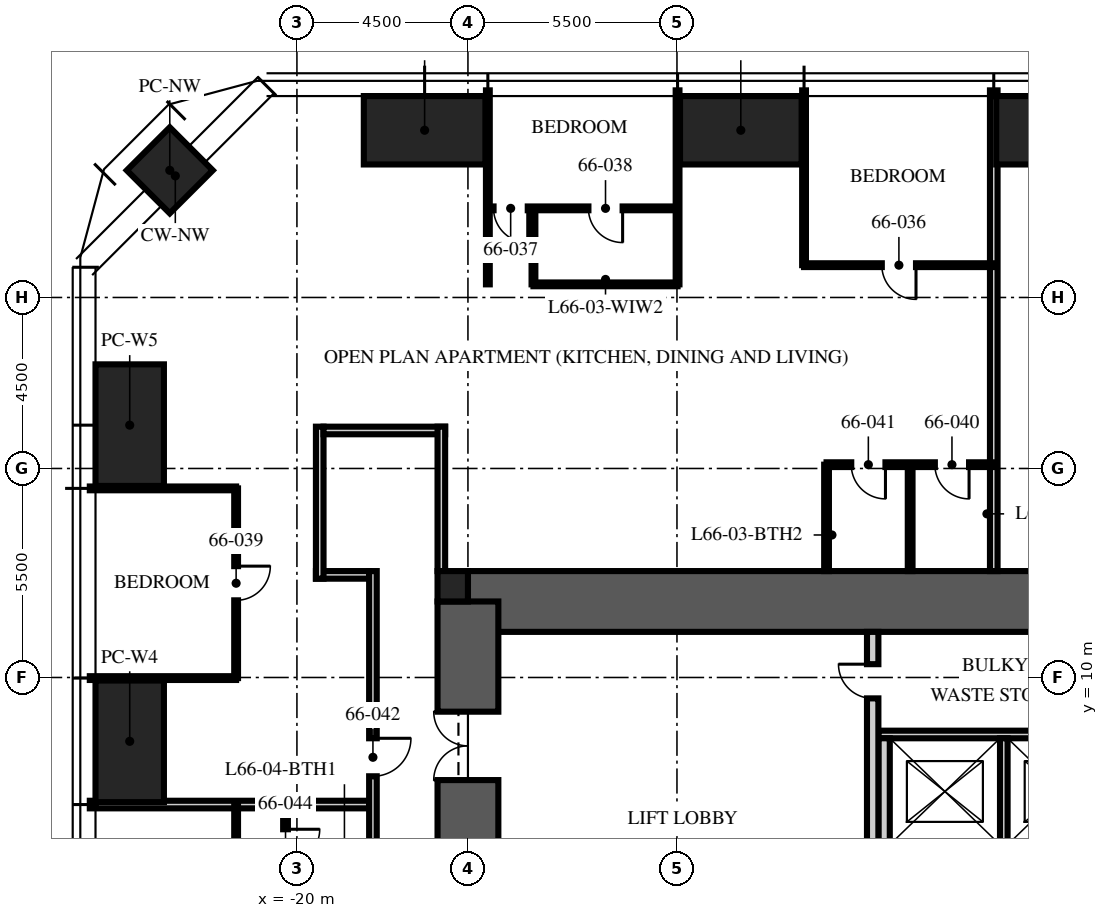
"""IFC4 building model, lengths in metres.
Left out: names, types, materials, properties, quantities, classifications, styles, units other than length and angle.
Written with IfcOpenShell. Run it as: python <this file> out.ifc"""

import sys

from ifc_helpers import new_model, si_unit, direction, frame, frame_2d, origin, origin_2d, place, context, subcontext, project, spatial, rectangle, hollow_rectangle, extrude, element, fill, save


model = new_model("IFC4")
c1 = context("Model", 3, precision=1e-05, world=origin(), true_north=direction((0.0, 1.0)))
c2 = subcontext(c1, "Body", "Model", "MODEL_VIEW")
j1 = project(units=[si_unit("LENGTHUNIT", "METRE"), si_unit("PLANEANGLEUNIT", "RADIAN")], contexts=[c1])
p1 = place(None, origin())
s1 = spatial("IfcSite", under=j1, at=p1, CompositionType="ELEMENT")
p2 = place(p1, origin())
s2 = spatial("IfcBuilding", under=s1, at=p2, CompositionType="ELEMENT")
p3 = place(p2, frame((0.0, 0.0, 263.25)))
s3 = spatial("IfcBuildingStorey", under=s2, at=p3, CompositionType="ELEMENT", Elevation=263.25)
p4 = place(p3, frame((-15.5, 12.0, -0.25), z_axis=(0.0, 0.0, 1.0), x_axis=(1.0, 0.0, 0.0)))
e1 = element("IfcWall", 1, at=p4, inside=s3, PredefinedType="SHEAR", context=c2, shape_type="SweptSolid", body=[
    extrude(rectangle(XDim=31.0, YDim=1.6, at=frame_2d((15.5, 0.0))), origin(), (0.0, 0.0, 1.0), 3.75),
])
p5 = place(p3, frame((-15.5, -12.0, -0.25), z_axis=(0.0, 0.0, 1.0), x_axis=(0.0, 1.0, 0.0)))
e2 = element("IfcWall", 2, at=p5, inside=s3, PredefinedType="SHEAR", context=c2, shape_type="SweptSolid", body=[
    extrude(rectangle(XDim=24.0, YDim=1.6, at=frame_2d((12.0, 0.0))), origin(), (0.0, 0.0, 1.0), 3.75),
])
p6 = place(p5, frame((3.2, 0.0, 0.25)))
e3 = element("IfcOpeningElement", 3, at=p6, cuts=e2, PredefinedType="OPENING", context=c2, shape_type="SweptSolid", body=[
    extrude(rectangle(XDim=1.2, YDim=2.1, at=frame_2d((0.6, 1.05))), frame((0.0, 0.81, 0.0), z_axis=(0.0, -1.0, 0.0), x_axis=(1.0, 0.0, 0.0)), (0.0, 0.0, 1.0), 1.62),
])
p7 = place(p5, frame((19.3, 0.0, 0.25)))
e4 = element("IfcOpeningElement", 4, at=p7, cuts=e2, PredefinedType="OPENING", context=c2, shape_type="SweptSolid", body=[
    extrude(rectangle(XDim=1.8, YDim=2.1, at=frame_2d((0.9, 1.05))), frame((0.0, 0.81, 0.0), z_axis=(0.0, -1.0, 0.0), x_axis=(1.0, 0.0, 0.0)), (0.0, 0.0, 1.0), 1.62),
])
p8 = place(p3, frame((-15.9, 12.4, -0.25), z_axis=(0.0, 0.0, 1.0), x_axis=(1.0, 0.0, 0.0)))
e5 = element("IfcColumn", 5, at=p8, inside=s3, PredefinedType="COLUMN", context=c2, shape_type="SweptSolid", body=[
    extrude(rectangle(XDim=0.8, YDim=0.8, at=origin_2d()), origin(), (0.0, 0.0, 1.0), 3.75),
])
for number, where, z_axis, x_axis in (
    (6, (-16.64, 24.4, 0.0), (0.0, 0.0, 1.0), (1.0, 0.0, 0.0)),
    (7, (-8.32, 24.4, 0.0), (0.0, 0.0, 1.0), (1.0, 0.0, 0.0)),
    (8, (0.0, 24.4, 0.0), (0.0, 0.0, 1.0), (1.0, 0.0, 0.0)),
    (9, (-24.4, 8.32, 0.0), (0.0, 0.0, 1.0), (0.0, 1.0, 0.0)),
    (10, (-24.4, 16.64, 0.0), (0.0, 0.0, 1.0), (0.0, 1.0, 0.0)),
):
    element("IfcColumn", number, at=place(p3, frame(where, z_axis=z_axis, x_axis=x_axis)), inside=s3, PredefinedType="COLUMN", context=c2, shape_type="SweptSolid", body=[
        extrude(hollow_rectangle(XDim=3.2, YDim=1.8, WallThickness=0.14, at=origin_2d()), origin(), (0.0, 0.0, 1.0), 3.75),
    ])
p9 = place(p3, frame((-23.346, 23.346, 0.0), z_axis=(0.0, 0.0, 1.0), x_axis=(0.707106781187, 0.707106781187, 0.0)))
e11 = element("IfcColumn", 11, at=p9, inside=s3, PredefinedType="COLUMN", context=c2, shape_type="SweptSolid", body=[
    extrude(hollow_rectangle(XDim=1.6, YDim=1.6, WallThickness=0.1, at=origin_2d()), origin(), (0.0, 0.0, 1.0), 3.75),
])
p10 = place(p3, frame((-4.7, 8.5, 0.0), z_axis=(0.0, 0.0, 1.0), x_axis=(1.0, 0.0, 0.0)))
e12 = element("IfcWall", 12, at=p10, inside=s3, PredefinedType="PARTITIONING", context=c2, shape_type="SweptSolid", body=[
    extrude(rectangle(XDim=9.7, YDim=0.2, at=frame_2d((4.85, 0.0))), origin(), (0.0, 0.0, 1.0), 3.5),
])
p11 = place(p3, frame((-4.55, 5.6, 0.0), z_axis=(0.0, 0.0, 1.0), x_axis=(0.0, 1.0, 0.0)))
e13 = element("IfcWall", 13, at=p11, inside=s3, PredefinedType="PARTITIONING", context=c2, shape_type="SweptSolid", body=[
    extrude(rectangle(XDim=2.8, YDim=0.3, at=frame_2d((1.4, 0.0))), origin(), (0.0, 0.0, 1.0), 3.5),
])
p12 = place(p3, frame((-1.4, 5.6, 0.0), z_axis=(0.0, 0.0, 1.0), x_axis=(0.0, 1.0, 0.0)))
e14 = element("IfcWall", 14, at=p12, inside=s3, PredefinedType="PARTITIONING", context=c2, shape_type="SweptSolid", body=[
    extrude(rectangle(XDim=2.8, YDim=0.2, at=frame_2d((1.4, 0.0))), origin(), (0.0, 0.0, 1.0), 3.5),
])
p13 = place(p3, frame((-4.85, 5.3, 0.0), z_axis=(0.0, 0.0, 1.0), x_axis=(0.0, 1.0, 0.0)))
e15 = element("IfcWall", 15, at=p13, inside=s3, PredefinedType="PARTITIONING", context=c2, shape_type="SweptSolid", body=[
    extrude(rectangle(XDim=5.9, YDim=0.3, at=frame_2d((2.95, 0.0))), origin(), (0.0, 0.0, 1.0), 3.5),
])
p14 = place(p13, frame((4.15, 0.0, 0.0)))
e16 = element("IfcOpeningElement", 16, at=p14, cuts=e15, PredefinedType="OPENING", context=c2, shape_type="SweptSolid", body=[
    extrude(rectangle(XDim=0.9, YDim=2.1, at=frame_2d((0.45, 1.05))), frame((0.0, 0.16, 0.0), z_axis=(0.0, -1.0, 0.0), x_axis=(1.0, 0.0, 0.0)), (0.0, 0.0, 1.0), 0.32),
])
p15 = place(p3, frame((-18.1, 12.7, 0.0), z_axis=(0.0, 0.0, 1.0), x_axis=(-1.0, 0.0, 0.0)))
e17 = element("IfcWall", 17, at=p15, inside=s3, PredefinedType="PARTITIONING", context=c2, shape_type="SweptSolid", body=[
    extrude(rectangle(XDim=1.4, YDim=0.2, at=frame_2d((0.7, 0.0))), origin(), (0.0, 0.0, 1.0), 2.81),
])
p16 = place(p3, frame((-19.4, 12.6, 0.0), z_axis=(0.0, 0.0, 1.0), x_axis=(0.0, 1.0, 0.0)))
e18 = element("IfcWall", 18, at=p16, inside=s3, PredefinedType="PARTITIONING", context=c2, shape_type="SweptSolid", body=[
    extrude(rectangle(XDim=4.0, YDim=0.2, at=frame_2d((2.0, 0.0))), origin(), (0.0, 0.0, 1.0), 2.6),
])
p17 = place(p3, frame((-19.3, 16.5, 0.0), z_axis=(0.0, 0.0, 1.0), x_axis=(1.0, 0.0, 0.0)))
e19 = element("IfcWall", 19, at=p17, inside=s3, PredefinedType="PARTITIONING", context=c2, shape_type="SweptSolid", body=[
    extrude(rectangle(XDim=3.2, YDim=0.2, at=frame_2d((1.6, 0.0))), origin(), (0.0, 0.0, 1.0), 2.3),
])
p18 = place(p3, frame((-16.2, 16.6, 0.0), z_axis=(0.0, 0.0, 1.0), x_axis=(0.0, -1.0, 0.0)))
e20 = element("IfcWall", 20, at=p18, inside=s3, PredefinedType="PARTITIONING", context=c2, shape_type="SweptSolid", body=[
    extrude(rectangle(XDim=3.8, YDim=0.2, at=frame_2d((1.9, 0.0))), origin(), (0.0, 0.0, 1.0), 2.3),
])
p19 = place(p3, frame((-1.664, 12.8, 0.0), z_axis=(0.0, 0.0, 1.0), x_axis=(0.0, 1.0, 0.0)))
e21 = element("IfcWall", 21, at=p19, inside=s3, PredefinedType="PARTITIONING", context=c2, shape_type="SweptSolid", body=[
    extrude(rectangle(XDim=12.65, YDim=0.2, at=frame_2d((6.325, 0.0))), origin(), (0.0, 0.0, 1.0), 2.91),
])
p20 = place(p3, frame((-6.656, 20.85, 0.0), z_axis=(0.0, 0.0, 1.0), x_axis=(0.0, 1.0, 0.0)))
e22 = element("IfcWall", 22, at=p20, inside=s3, PredefinedType="PARTITIONING", context=c2, shape_type="SweptSolid", body=[
    extrude(rectangle(XDim=4.6, YDim=0.1, at=frame_2d((2.3, 0.0))), origin(), (0.0, 0.0, 1.0), 2.91),
])
for number, where, z_axis, x_axis in (
    (23, (-9.984, 20.345, 0.0), (0.0, 0.0, 1.0), (0.0, 1.0, 0.0)),
    (24, (-14.976, 20.345, 0.0), (0.0, 0.0, 1.0), (0.0, 1.0, 0.0)),
):
    element("IfcWall", number, at=place(p3, frame(where, z_axis=z_axis, x_axis=x_axis)), inside=s3, PredefinedType="PARTITIONING", context=c2, shape_type="SweptSolid", body=[
        extrude(rectangle(XDim=5.105, YDim=0.1, at=frame_2d((2.552, 0.0))), origin(), (0.0, 0.0, 1.0), 2.91),
    ])
for number, where, z_axis, x_axis in (
    (25, (-21.6, 14.976, 0.0), (0.0, 0.0, 1.0), (-1.0, 0.0, 0.0)),
    (26, (-21.6, 9.984, 0.0), (0.0, 0.0, 1.0), (-1.0, 0.0, 0.0)),
):
    element("IfcWall", number, at=place(p3, frame(where, z_axis=z_axis, x_axis=x_axis)), inside=s3, PredefinedType="PARTITIONING", context=c2, shape_type="SweptSolid", body=[
        extrude(rectangle(XDim=3.85, YDim=0.1, at=frame_2d((1.925, 0.0))), origin(), (0.0, 0.0, 1.0), 2.91),
    ])
p21 = place(p3, frame((-18.1, 6.656, 0.0), z_axis=(0.0, 0.0, 1.0), x_axis=(-1.0, 0.0, 0.0)))
e27 = element("IfcWall", 27, at=p21, inside=s3, PredefinedType="PARTITIONING", context=c2, shape_type="SweptSolid", body=[
    extrude(rectangle(XDim=7.35, YDim=0.2, at=frame_2d((3.675, 0.0))), origin(), (0.0, 0.0, 1.0), 2.91),
])
p22 = place(p3, frame((-1.664, 20.85, 0.0), z_axis=(0.0, 0.0, 1.0), x_axis=(-1.0, 0.0, 0.0)))
e28 = element("IfcWall", 28, at=p22, inside=s3, PredefinedType="PARTITIONING", context=c2, shape_type="SweptSolid", body=[
    extrude(rectangle(XDim=4.992, YDim=0.1, at=frame_2d((2.496, 0.0))), origin(), (0.0, 0.0, 1.0), 2.81),
])
p23 = place(p22, frame((2.046, 0.0, 0.0)))
e29 = element("IfcOpeningElement", 29, at=p23, cuts=e28, PredefinedType="OPENING", context=c2, shape_type="SweptSolid", body=[
    extrude(rectangle(XDim=0.9, YDim=2.1, at=frame_2d((0.45, 1.05))), frame((0.0, 0.06, 0.0), z_axis=(0.0, -1.0, 0.0), x_axis=(1.0, 0.0, 0.0)), (0.0, 0.0, 1.0), 0.12),
])
p24 = place(p3, frame((-9.984, 22.345, 0.0), z_axis=(0.0, 0.0, 1.0), x_axis=(-1.0, 0.0, 0.0)))
e30 = element("IfcWall", 30, at=p24, inside=s3, PredefinedType="PARTITIONING", context=c2, shape_type="SweptSolid", body=[
    extrude(rectangle(XDim=4.992, YDim=0.1, at=frame_2d((2.496, 0.0))), origin(), (0.0, 0.0, 1.0), 2.81),
])
p25 = place(p24, frame((3.942, 0.0, 0.0)))
e31 = element("IfcOpeningElement", 31, at=p25, cuts=e30, PredefinedType="OPENING", context=c2, shape_type="SweptSolid", body=[
    extrude(rectangle(XDim=0.9, YDim=2.1, at=frame_2d((0.45, 1.05))), frame((0.0, 0.06, 0.0), z_axis=(0.0, -1.0, 0.0), x_axis=(1.0, 0.0, 0.0)), (0.0, 0.0, 1.0), 0.12),
])
p26 = place(p24, frame((1.446, 0.0, 0.0)))
e32 = element("IfcOpeningElement", 32, at=p26, cuts=e30, PredefinedType="OPENING", context=c2, shape_type="SweptSolid", body=[
    extrude(rectangle(XDim=0.9, YDim=2.1, at=frame_2d((0.45, 1.05))), frame((0.0, 0.06, 0.0), z_axis=(0.0, -1.0, 0.0), x_axis=(1.0, 0.0, 0.0)), (0.0, 0.0, 1.0), 0.12),
])
p27 = place(p3, frame((-13.776, 20.345, 0.0), z_axis=(0.0, 0.0, 1.0), x_axis=(0.0, 1.0, 0.0)))
e33 = element("IfcWall", 33, at=p27, inside=s3, PredefinedType="PARTITIONING", context=c2, shape_type="SweptSolid", body=[
    extrude(rectangle(XDim=2.0, YDim=0.1, at=frame_2d((1.0, 0.0))), origin(), (0.0, 0.0, 1.0), 3.5),
])
p28 = place(p3, frame((-9.984, 20.345, 0.0), z_axis=(0.0, 0.0, 1.0), x_axis=(-1.0, 0.0, 0.0)))
e34 = element("IfcWall", 34, at=p28, inside=s3, PredefinedType="PARTITIONING", context=c2, shape_type="SweptSolid", body=[
    extrude(rectangle(XDim=3.792, YDim=0.1, at=frame_2d((1.896, 0.0))), origin(), (0.0, 0.0, 1.0), 2.81),
])
p29 = place(p3, frame((-21.6, 14.976, 0.0), z_axis=(0.0, 0.0, 1.0), x_axis=(0.0, -1.0, 0.0)))
e35 = element("IfcWall", 35, at=p29, inside=s3, PredefinedType="PARTITIONING", context=c2, shape_type="SweptSolid", body=[
    extrude(rectangle(XDim=4.992, YDim=0.1, at=frame_2d((2.496, 0.0))), origin(), (0.0, 0.0, 1.0), 2.81),
])
p30 = place(p29, frame((2.046, 0.0, 0.0)))
e36 = element("IfcOpeningElement", 36, at=p30, cuts=e35, PredefinedType="OPENING", context=c2, shape_type="SweptSolid", body=[
    extrude(rectangle(XDim=0.9, YDim=2.1, at=frame_2d((0.45, 1.05))), frame((0.0, 0.06, 0.0), z_axis=(0.0, -1.0, 0.0), x_axis=(1.0, 0.0, 0.0)), (0.0, 0.0, 1.0), 0.12),
])
p31 = place(p3, frame((-1.664, 15.6, 0.0), z_axis=(0.0, 0.0, 1.0), x_axis=(-1.0, 0.0, 0.0)))
e37 = element("IfcWall", 37, at=p31, inside=s3, PredefinedType="PARTITIONING", context=c2, shape_type="SweptSolid", body=[
    extrude(rectangle(XDim=4.4, YDim=0.125, at=frame_2d((2.2, 0.0))), origin(), (0.0, 0.0, 1.0), 2.81),
])
p32 = place(p31, frame((0.65, 0.0, 0.0)))
e38 = element("IfcOpeningElement", 38, at=p32, cuts=e37, PredefinedType="OPENING", context=c2, shape_type="SweptSolid", body=[
    extrude(rectangle(XDim=0.9, YDim=2.1, at=frame_2d((0.45, 1.05))), frame((0.0, 0.073, 0.0), z_axis=(0.0, -1.0, 0.0), x_axis=(1.0, 0.0, 0.0)), (0.0, 0.0, 1.0), 0.145),
])
p33 = place(p31, frame((2.85, 0.0, 0.0)))
e39 = element("IfcOpeningElement", 39, at=p33, cuts=e37, PredefinedType="OPENING", context=c2, shape_type="SweptSolid", body=[
    extrude(rectangle(XDim=0.9, YDim=2.1, at=frame_2d((0.45, 1.05))), frame((0.0, 0.073, 0.0), z_axis=(0.0, -1.0, 0.0), x_axis=(1.0, 0.0, 0.0)), (0.0, 0.0, 1.0), 0.145),
])
for number, where, z_axis, x_axis in (
    (40, (-3.864, 12.8, 0.0), (0.0, 0.0, 1.0), (0.0, 1.0, 0.0)),
    (41, (-6.064, 12.8, 0.0), (0.0, 0.0, 1.0), (0.0, 1.0, 0.0)),
):
    element("IfcWall", number, at=place(p3, frame(where, z_axis=z_axis, x_axis=x_axis)), inside=s3, PredefinedType="PARTITIONING", context=c2, shape_type="SweptSolid", body=[
        extrude(rectangle(XDim=2.8, YDim=0.125, at=frame_2d((1.4, 0.0))), origin(), (0.0, 0.0, 1.0), 3.5),
    ])
p34 = place(p3, frame((-21.6, 6.656, 0.0), z_axis=(0.0, 0.0, 1.0), x_axis=(0.0, -1.0, 0.0)))
e42 = element("IfcWall", 42, at=p34, inside=s3, PredefinedType="PARTITIONING", context=c2, shape_type="SweptSolid", body=[
    extrude(rectangle(XDim=4.992, YDim=0.1, at=frame_2d((2.496, 0.0))), origin(), (0.0, 0.0, 1.0), 2.81),
])
p35 = place(p34, frame((2.046, 0.0, 0.0)))
e43 = element("IfcOpeningElement", 43, at=p35, cuts=e42, PredefinedType="OPENING", context=c2, shape_type="SweptSolid", body=[
    extrude(rectangle(XDim=0.9, YDim=2.1, at=frame_2d((0.45, 1.05))), frame((0.0, 0.06, 0.0), z_axis=(0.0, -1.0, 0.0), x_axis=(1.0, 0.0, 0.0)), (0.0, 0.0, 1.0), 0.12),
])
p36 = place(p3, frame((-20.3, 6.656, 0.0), z_axis=(0.0, 0.0, 1.0), x_axis=(0.0, -1.0, 0.0)))
e44 = element("IfcWall", 44, at=p36, inside=s3, PredefinedType="PARTITIONING", context=c2, shape_type="SweptSolid", body=[
    extrude(rectangle(XDim=2.2, YDim=0.125, at=frame_2d((1.1, 0.0))), origin(), (0.0, 0.0, 1.0), 3.5),
])
p37 = place(p36, frame((0.65, 0.0, 0.0)))
e45 = element("IfcOpeningElement", 45, at=p37, cuts=e44, PredefinedType="OPENING", context=c2, shape_type="SweptSolid", body=[
    extrude(rectangle(XDim=0.9, YDim=2.1, at=frame_2d((0.45, 1.05))), frame((0.0, 0.073, 0.0), z_axis=(0.0, -1.0, 0.0), x_axis=(1.0, 0.0, 0.0)), (0.0, 0.0, 1.0), 0.145),
])
p38 = place(p3, frame((-18.0, 12.8, 0.0), z_axis=(0.0, 0.0, 1.0), x_axis=(0.0, -1.0, 0.0)))
e46 = element("IfcWall", 46, at=p38, inside=s3, PredefinedType="PARTITIONING", context=c2, shape_type="SweptSolid", body=[
    extrude(rectangle(XDim=25.8, YDim=0.2, at=frame_2d((12.9, 0.0))), origin(), (0.0, 0.0, 1.0), 2.6),
])
p39 = place(p38, frame((4.4, 0.0, 0.0)))
e47 = element("IfcOpeningElement", 47, at=p39, cuts=e46, PredefinedType="OPENING", context=c2, shape_type="SweptSolid", body=[
    extrude(rectangle(XDim=1.0, YDim=2.2, at=frame_2d((0.5, 1.1))), frame((0.0, 0.11, 0.0), z_axis=(0.0, -1.0, 0.0), x_axis=(1.0, 0.0, 0.0)), (0.0, 0.0, 1.0), 0.22),
])
p40 = place(p38, frame((12.914, 0.0, 0.0)))
e48 = element("IfcOpeningElement", 48, at=p40, cuts=e46, PredefinedType="OPENING", context=c2, shape_type="SweptSolid", body=[
    extrude(rectangle(XDim=1.0, YDim=2.2, at=frame_2d((0.5, 1.1))), frame((0.0, 0.11, 0.0), z_axis=(0.0, -1.0, 0.0), x_axis=(1.0, 0.0, 0.0)), (0.0, 0.0, 1.0), 0.22),
])
p41 = place(p38, frame((23.484, 0.0, 0.0)))
e49 = element("IfcOpeningElement", 49, at=p41, cuts=e46, PredefinedType="OPENING", context=c2, shape_type="SweptSolid", body=[
    extrude(rectangle(XDim=1.0, YDim=2.2, at=frame_2d((0.5, 1.1))), frame((0.0, 0.11, 0.0), z_axis=(0.0, -1.0, 0.0), x_axis=(1.0, 0.0, 0.0)), (0.0, 0.0, 1.0), 0.22),
])
p42 = place(p7, origin())
e50 = element("IfcDoor", 50, at=p42, inside=s3, OperationType="DOUBLE_DOOR_SINGLE_SWING", PredefinedType="DOOR", context=c2, shape_type="SweptSolid", body=[
    extrude(rectangle(XDim=1.8, YDim=2.1, at=frame_2d((0.9, 1.05))), frame((0.0, 0.025, 0.0), z_axis=(0.0, -1.0, 0.0), x_axis=(1.0, 0.0, 0.0)), (0.0, 0.0, 1.0), 0.05),
])
fill(e4, e50)
p43 = place(p14, origin())
e51 = element("IfcDoor", 51, at=p43, inside=s3, OperationType="SINGLE_SWING_RIGHT", PredefinedType="DOOR", context=c2, shape_type="SweptSolid", body=[
    extrude(rectangle(XDim=0.9, YDim=2.1, at=frame_2d((0.45, 1.05))), frame((0.0, 0.025, 0.0), z_axis=(0.0, -1.0, 0.0), x_axis=(1.0, 0.0, 0.0)), (0.0, 0.0, 1.0), 0.05),
])
fill(e16, e51)
p44 = place(p23, origin())
e52 = element("IfcDoor", 52, at=p44, inside=s3, OperationType="SINGLE_SWING_LEFT", PredefinedType="DOOR", context=c2, shape_type="SweptSolid", body=[
    extrude(rectangle(XDim=0.9, YDim=2.1, at=frame_2d((0.45, 1.05))), frame((0.0, 0.025, 0.0), z_axis=(0.0, -1.0, 0.0), x_axis=(1.0, 0.0, 0.0)), (0.0, 0.0, 1.0), 0.05),
])
fill(e29, e52)
p45 = place(p25, origin())
e53 = element("IfcDoor", 53, at=p45, inside=s3, OperationType="SINGLE_SWING_LEFT", PredefinedType="DOOR", context=c2, shape_type="SweptSolid", body=[
    extrude(rectangle(XDim=0.9, YDim=2.1, at=frame_2d((0.45, 1.05))), frame((0.0, 0.025, 0.0), z_axis=(0.0, -1.0, 0.0), x_axis=(1.0, 0.0, 0.0)), (0.0, 0.0, 1.0), 0.05),
])
fill(e31, e53)
p46 = place(p26, origin())
e54 = element("IfcDoor", 54, at=p46, inside=s3, OperationType="SINGLE_SWING_LEFT", PredefinedType="DOOR", context=c2, shape_type="SweptSolid", body=[
    extrude(rectangle(XDim=0.9, YDim=2.1, at=frame_2d((0.45, 1.05))), frame((0.0, 0.025, 0.0), z_axis=(0.0, -1.0, 0.0), x_axis=(1.0, 0.0, 0.0)), (0.0, 0.0, 1.0), 0.05),
])
fill(e32, e54)
p47 = place(p30, origin())
e55 = element("IfcDoor", 55, at=p47, inside=s3, OperationType="SINGLE_SWING_LEFT", PredefinedType="DOOR", context=c2, shape_type="SweptSolid", body=[
    extrude(rectangle(XDim=0.9, YDim=2.1, at=frame_2d((0.45, 1.05))), frame((0.0, 0.025, 0.0), z_axis=(0.0, -1.0, 0.0), x_axis=(1.0, 0.0, 0.0)), (0.0, 0.0, 1.0), 0.05),
])
fill(e36, e55)
p48 = place(p32, origin())
e56 = element("IfcDoor", 56, at=p48, inside=s3, OperationType="SINGLE_SWING_LEFT", PredefinedType="DOOR", context=c2, shape_type="SweptSolid", body=[
    extrude(rectangle(XDim=0.9, YDim=2.1, at=frame_2d((0.45, 1.05))), frame((0.0, 0.025, 0.0), z_axis=(0.0, -1.0, 0.0), x_axis=(1.0, 0.0, 0.0)), (0.0, 0.0, 1.0), 0.05),
])
fill(e38, e56)
p49 = place(p33, origin())
e57 = element("IfcDoor", 57, at=p49, inside=s3, OperationType="SINGLE_SWING_LEFT", PredefinedType="DOOR", context=c2, shape_type="SweptSolid", body=[
    extrude(rectangle(XDim=0.9, YDim=2.1, at=frame_2d((0.45, 1.05))), frame((0.0, 0.025, 0.0), z_axis=(0.0, -1.0, 0.0), x_axis=(1.0, 0.0, 0.0)), (0.0, 0.0, 1.0), 0.05),
])
fill(e39, e57)
p50 = place(p39, origin())
e58 = element("IfcDoor", 58, at=p50, inside=s3, OperationType="SINGLE_SWING_LEFT", PredefinedType="DOOR", context=c2, shape_type="SweptSolid", body=[
    extrude(rectangle(XDim=1.0, YDim=2.2, at=frame_2d((0.5, 1.1))), frame((0.0, 0.025, 0.0), z_axis=(0.0, -1.0, 0.0), x_axis=(1.0, 0.0, 0.0)), (0.0, 0.0, 1.0), 0.05),
])
fill(e47, e58)
p51 = place(p37, origin())
e59 = element("IfcDoor", 59, at=p51, inside=s3, OperationType="SINGLE_SWING_LEFT", PredefinedType="DOOR", context=c2, shape_type="SweptSolid", body=[
    extrude(rectangle(XDim=0.9, YDim=2.1, at=frame_2d((0.45, 1.05))), frame((0.0, 0.025, 0.0), z_axis=(0.0, -1.0, 0.0), x_axis=(1.0, 0.0, 0.0)), (0.0, 0.0, 1.0), 0.05),
])
fill(e45, e59)
save(model, sys.argv[1])
